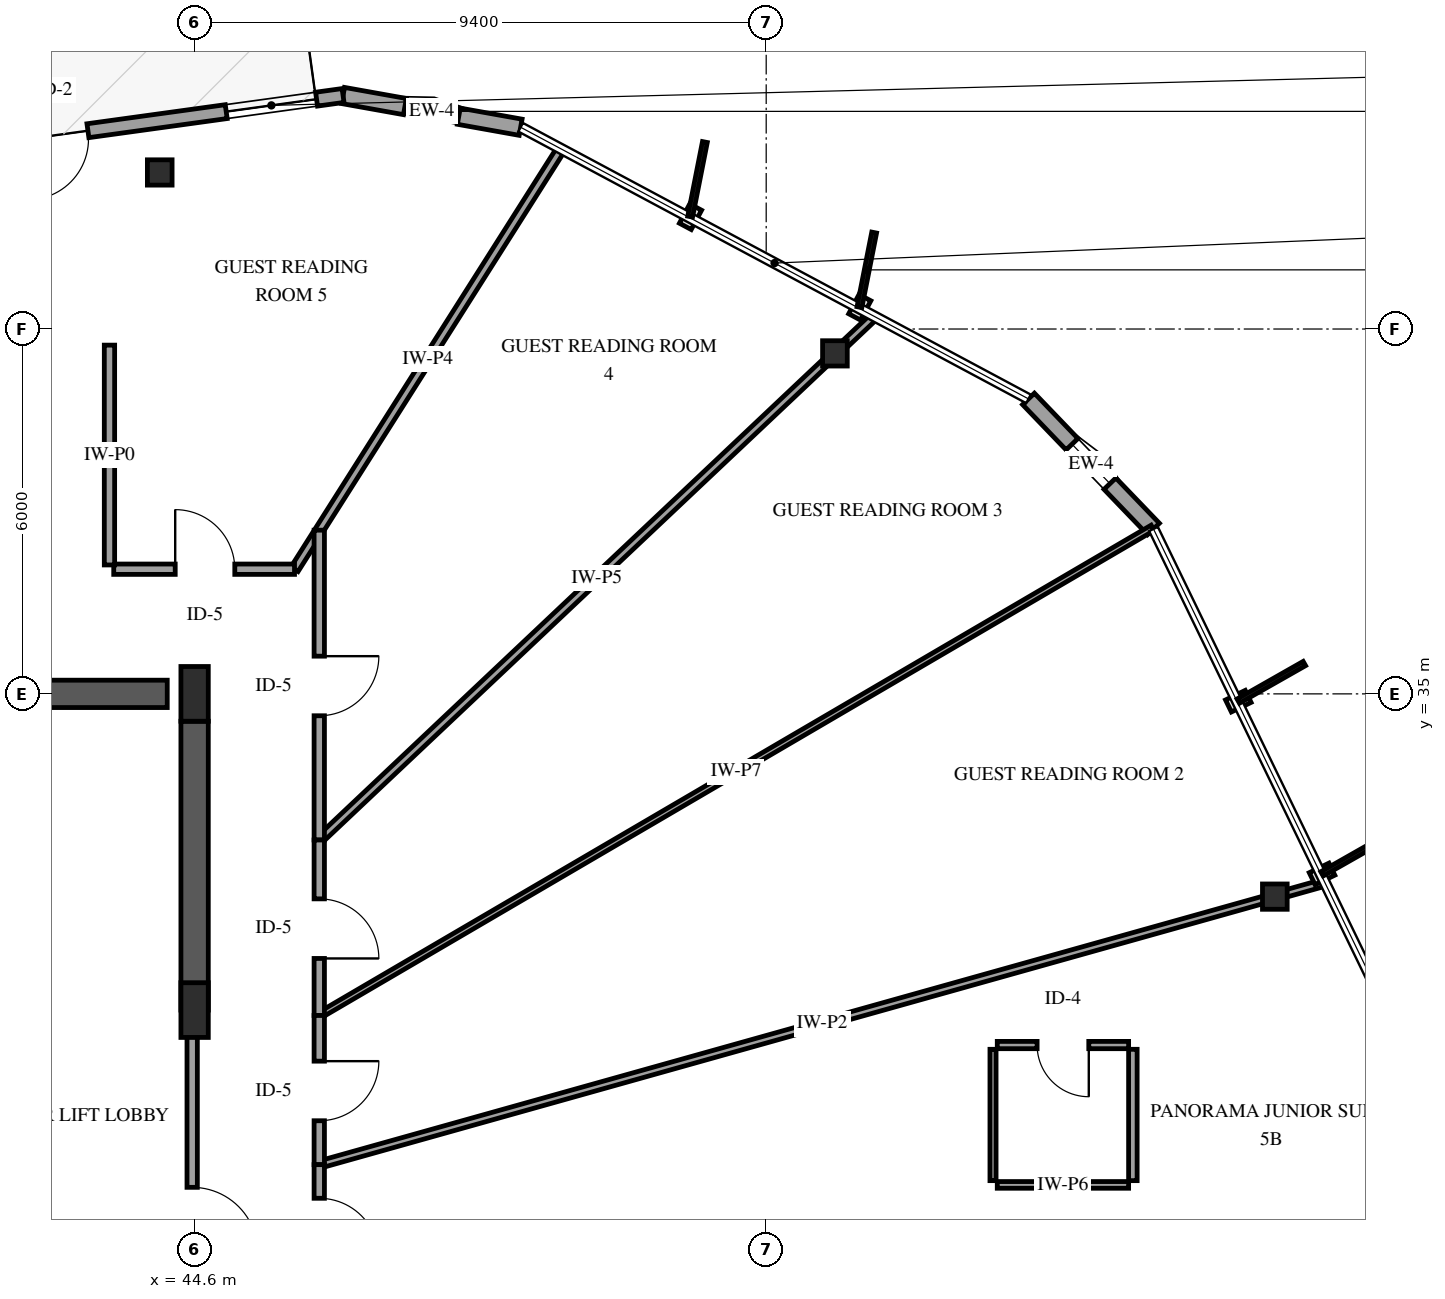
"""IFC4 building model, lengths in metres.
Left out: names, types, materials, properties, quantities, classifications, styles, units other than length and angle.
Written with IfcOpenShell. Run it as: python <this file> out.ifc"""

import sys

from ifc_helpers import new_model, si_unit, direction, frame, frame_2d, origin, origin_2d, place, context, subcontext, project, spatial, rectangle, i_section, extrude, element, fill, save


model = new_model("IFC4")
c1 = context("Model", 3, precision=1e-05, world=origin(), true_north=direction((0.0, 1.0)))
c2 = subcontext(c1, "Body", "Model", "MODEL_VIEW")
j1 = project(units=[si_unit("LENGTHUNIT", "METRE"), si_unit("PLANEANGLEUNIT", "RADIAN")], contexts=[c1])
p1 = place(None, origin())
s1 = spatial("IfcSite", under=j1, at=p1, CompositionType="ELEMENT")
p2 = place(p1, origin())
s2 = spatial("IfcBuilding", under=s1, at=p2, CompositionType="ELEMENT")
p3 = place(p2, frame((0.0, 0.0, 194.2)))
s3 = spatial("IfcBuildingStorey", under=s2, at=p3, CompositionType="ELEMENT", Elevation=194.2)
p4 = place(p3, frame((41.3, 35.0, 0.0), z_axis=(0.0, 0.0, 1.0), x_axis=(1.0, 0.0, 0.0)))
e1 = element("IfcWall", 1, at=p4, inside=s3, PredefinedType="SHEAR", context=c2, shape_type="SweptSolid", body=[
    extrude(rectangle(XDim=2.85, YDim=0.45, at=frame_2d((1.425, 0.0))), origin(), (0.0, 0.0, 1.0), 3.6),
])
p5 = place(p3, frame((44.6, 29.8, 0.0), z_axis=(0.0, 0.0, 1.0), x_axis=(0.0, 1.0, 0.0)))
e2 = element("IfcWall", 2, at=p5, inside=s3, PredefinedType="SHEAR", context=c2, shape_type="SweptSolid", body=[
    extrude(rectangle(XDim=4.75, YDim=0.45, at=frame_2d((2.375, 0.0))), origin(), (0.0, 0.0, 1.0), 3.6),
])
for number, where, z_axis, x_axis in (
    (3, (44.6, 29.8, 0.0), (0.0, 0.0, 1.0), (1.0, 0.0, 0.0)),
    (4, (44.6, 35.0, 0.0), (0.0, 0.0, 1.0), (1.0, 0.0, 0.0)),
):
    element("IfcColumn", number, at=place(p3, frame(where, z_axis=z_axis, x_axis=x_axis)), inside=s3, PredefinedType="PILASTER", context=c2, shape_type="SweptSolid", body=[
        extrude(rectangle(XDim=0.45, YDim=0.9, at=origin_2d()), origin(), (0.0, 0.0, 1.0), 3.6),
    ])
for number, where, z_axis, x_axis in (
    (5, (62.365, 31.666, 0.0), (0.0, 0.0, 1.0), (1.0, 0.0, 0.0)),
    (6, (55.13, 40.599, 0.0), (0.0, 0.0, 1.0), (1.0, 0.0, 0.0)),
    (7, (44.027, 43.574, 0.0), (0.0, 0.0, 1.0), (1.0, 0.0, 0.0)),
):
    element("IfcColumn", number, at=place(p3, frame(where, z_axis=z_axis, x_axis=x_axis)), inside=s3, PredefinedType="COLUMN", context=c2, shape_type="SweptSolid", body=[
        extrude(i_section(OverallWidth=0.406, OverallDepth=0.416, WebThickness=0.03, FlangeThickness=0.048, FilletRadius=0.038, at=origin_2d()), origin(), (0.0, 0.0, 1.0), 3.6),
    ])
p6 = place(p3, frame((49.962, 44.318, 0.0), z_axis=(0.0, 0.0, 1.0), x_axis=(-0.984385841961, 0.176024186253, 0.0)))
e8 = element("IfcWall", 8, at=p6, inside=s3, PredefinedType="SOLIDWALL", context=c2, shape_type="SweptSolid", body=[
    extrude(rectangle(XDim=2.967, YDim=0.27, at=frame_2d((1.483, 0.0))), origin(), (0.0, 0.0, 1.0), 2.679),
])
p7 = place(p6, frame((1.033, 0.0, 0.75)))
e9 = element("IfcOpeningElement", 9, at=p7, cuts=e8, PredefinedType="OPENING", context=c2, shape_type="SweptSolid", body=[
    extrude(rectangle(XDim=0.9, YDim=1.5, at=frame_2d((0.45, 0.75))), frame((0.0, 0.145, 0.0), z_axis=(0.0, -1.0, 0.0), x_axis=(1.0, 0.0, 0.0)), (0.0, 0.0, 1.0), 0.29),
])
p8 = place(p3, frame((47.042, 44.84, 0.0), z_axis=(0.0, 0.0, 1.0), x_axis=(-0.990605602179, -0.136749921142, 0.0)))
e10 = element("IfcWall", 10, at=p8, inside=s3, PredefinedType="SOLIDWALL", context=c2, shape_type="SweptSolid", body=[
    extrude(rectangle(XDim=9.471, YDim=0.23, at=frame_2d((4.735, 0.0))), origin(), (0.0, 0.0, 1.0), 2.679),
])
p9 = place(p8, frame((4.236, 0.0, 0.0)))
e11 = element("IfcOpeningElement", 11, at=p9, cuts=e10, PredefinedType="OPENING", context=c2, shape_type="SweptSolid", body=[
    extrude(rectangle(XDim=1.0, YDim=2.15, at=frame_2d((0.5, 1.075))), frame((0.0, 0.125, 0.0), z_axis=(0.0, -1.0, 0.0), x_axis=(1.0, 0.0, 0.0)), (0.0, 0.0, 1.0), 0.25),
])
p10 = place(p8, frame((0.44, 0.0, 0.72)))
e12 = element("IfcOpeningElement", 12, at=p10, cuts=e10, PredefinedType="OPENING", context=c2, shape_type="SweptSolid", body=[
    extrude(rectangle(XDim=1.5, YDim=1.7, at=frame_2d((0.75, 0.85))), frame((0.0, 0.125, 0.0), z_axis=(0.0, -1.0, 0.0), x_axis=(1.0, 0.0, 0.0)), (0.0, 0.0, 1.0), 0.25),
])
p11 = place(p8, frame((6.29, 0.0, 0.72)))
e13 = element("IfcOpeningElement", 13, at=p11, cuts=e10, PredefinedType="OPENING", context=c2, shape_type="SweptSolid", body=[
    extrude(rectangle(XDim=1.5, YDim=1.7, at=frame_2d((0.75, 0.85))), frame((0.0, 0.125, 0.0), z_axis=(0.0, -1.0, 0.0), x_axis=(1.0, 0.0, 0.0)), (0.0, 0.0, 1.0), 0.25),
])
p12 = place(p3, frame((60.369, 37.712, 0.0), z_axis=(0.0, 0.0, 1.0), x_axis=(-0.692893222066, 0.721040208875, 0.0)))
e14 = element("IfcWall", 14, at=p12, inside=s3, PredefinedType="SOLIDWALL", context=c2, shape_type="SweptSolid", body=[
    extrude(rectangle(XDim=2.967, YDim=0.27, at=frame_2d((1.483, 0.0))), origin(), (0.0, 0.0, 1.0), 2.679),
])
p13 = place(p12, frame((1.033, 0.0, 0.75)))
e15 = element("IfcOpeningElement", 15, at=p13, cuts=e14, PredefinedType="OPENING", context=c2, shape_type="SweptSolid", body=[
    extrude(rectangle(XDim=0.9, YDim=1.5, at=frame_2d((0.45, 0.75))), frame((0.0, 0.145, 0.0), z_axis=(0.0, -1.0, 0.0), x_axis=(1.0, 0.0, 0.0)), (0.0, 0.0, 1.0), 0.29),
])
p14 = place(p3, frame((46.65, 27.258, 0.0), z_axis=(0.0, 0.0, 1.0), x_axis=(0.962839177332, 0.270075394279, 0.0)))
e16 = element("IfcWall", 16, at=p14, inside=s3, PredefinedType="PARTITIONING", context=c2, shape_type="SweptSolid", body=[
    extrude(rectangle(XDim=17.176, YDim=0.12, at=frame_2d((8.588, 0.0))), origin(), (0.0, 0.0, 1.0), 3.3),
])
p15 = place(p3, frame((46.65, 29.711, 0.0), z_axis=(0.0, 0.0, 1.0), x_axis=(0.863097832906, 0.505036761863, 0.0)))
e17 = element("IfcWall", 17, at=p15, inside=s3, PredefinedType="PARTITIONING", context=c2, shape_type="SweptSolid", body=[
    extrude(rectangle(XDim=15.88, YDim=0.1, at=frame_2d((7.94, 0.0))), origin(), (0.0, 0.0, 1.0), 3.3),
])
p16 = place(p3, frame((46.65, 32.597, 0.0), z_axis=(0.0, 0.0, 1.0), x_axis=(0.727327128762, 0.686290935221, 0.0)))
e18 = element("IfcWall", 18, at=p16, inside=s3, PredefinedType="PARTITIONING", context=c2, shape_type="SweptSolid", body=[
    extrude(rectangle(XDim=12.547, YDim=0.13, at=frame_2d((6.274, 0.0))), origin(), (0.0, 0.0, 1.0), 2.595),
])
p17 = place(p3, frame((46.243, 37.05, 0.0), z_axis=(0.0, 0.0, 1.0), x_axis=(0.535620370442, 0.844458891106, 0.0)))
e19 = element("IfcWall", 19, at=p17, inside=s3, PredefinedType="PARTITIONING", context=c2, shape_type="SweptSolid", body=[
    extrude(rectangle(XDim=8.185, YDim=0.14, at=frame_2d((4.093, 0.0))), origin(), (0.0, 0.0, 1.0), 3.3),
])
p18 = place(p3, frame((44.56, 29.8, 0.0), z_axis=(0.0, 0.0, 1.0), x_axis=(0.0, -1.0, 0.0)))
e20 = element("IfcWall", 20, at=p18, inside=s3, PredefinedType="PARTITIONING", context=c2, shape_type="SweptSolid", body=[
    extrude(rectangle(XDim=6.91, YDim=0.17, at=frame_2d((3.455, 0.0))), origin(), (0.0, 0.0, 1.0), 2.34),
])
p19 = place(p18, frame((2.915, 0.0, 0.0)))
e21 = element("IfcOpeningElement", 21, at=p19, cuts=e20, PredefinedType="OPENING", context=c2, shape_type="SweptSolid", body=[
    extrude(rectangle(XDim=1.08, YDim=2.15, at=frame_2d((0.54, 1.075))), frame((0.0, 0.095, 0.0), z_axis=(0.0, -1.0, 0.0), x_axis=(1.0, 0.0, 0.0)), (0.0, 0.0, 1.0), 0.19),
])
p20 = place(p3, frame((46.65, 37.692, 0.0), z_axis=(0.0, 0.0, 1.0), x_axis=(0.0, -1.0, 0.0)))
e22 = element("IfcWall", 22, at=p20, inside=s3, PredefinedType="PARTITIONING", context=c2, shape_type="SweptSolid", body=[
    extrude(rectangle(XDim=5.095, YDim=0.17, at=frame_2d((2.547, 0.0))), origin(), (0.0, 0.0, 1.0), 3.3),
])
p21 = place(p20, frame((2.072, 0.0, 0.0)))
e23 = element("IfcOpeningElement", 23, at=p21, cuts=e22, PredefinedType="OPENING", context=c2, shape_type="SweptSolid", body=[
    extrude(rectangle(XDim=0.98, YDim=2.15, at=frame_2d((0.49, 1.075))), frame((0.0, 0.095, 0.0), z_axis=(0.0, -1.0, 0.0), x_axis=(1.0, 0.0, 0.0)), (0.0, 0.0, 1.0), 0.19),
])
p22 = place(p3, frame((43.27, 37.05, 0.0), z_axis=(0.0, 0.0, 1.0), x_axis=(1.0, 0.0, 0.0)))
e24 = element("IfcWall", 24, at=p22, inside=s3, PredefinedType="PARTITIONING", context=c2, shape_type="SweptSolid", body=[
    extrude(rectangle(XDim=2.973, YDim=0.17, at=frame_2d((1.486, 0.0))), origin(), (0.0, 0.0, 1.0), 3.3),
])
p23 = place(p22, frame((1.011, 0.0, 0.0)))
e25 = element("IfcOpeningElement", 25, at=p23, cuts=e24, PredefinedType="OPENING", context=c2, shape_type="SweptSolid", body=[
    extrude(rectangle(XDim=0.98, YDim=2.15, at=frame_2d((0.49, 1.075))), frame((0.0, 0.095, 0.0), z_axis=(0.0, -1.0, 0.0), x_axis=(1.0, 0.0, 0.0)), (0.0, 0.0, 1.0), 0.19),
])
p24 = place(p3, frame((46.65, 32.597, 0.0), z_axis=(0.0, 0.0, 1.0), x_axis=(0.0, -1.0, 0.0)))
e26 = element("IfcWall", 26, at=p24, inside=s3, PredefinedType="PARTITIONING", context=c2, shape_type="SweptSolid", body=[
    extrude(rectangle(XDim=2.886, YDim=0.17, at=frame_2d((1.443, 0.0))), origin(), (0.0, 0.0, 1.0), 3.3),
])
p25 = place(p24, frame((0.968, 0.0, 0.0)))
e27 = element("IfcOpeningElement", 27, at=p25, cuts=e26, PredefinedType="OPENING", context=c2, shape_type="SweptSolid", body=[
    extrude(rectangle(XDim=0.98, YDim=2.15, at=frame_2d((0.49, 1.075))), frame((0.0, 0.095, 0.0), z_axis=(0.0, -1.0, 0.0), x_axis=(1.0, 0.0, 0.0)), (0.0, 0.0, 1.0), 0.19),
])
p26 = place(p3, frame((46.65, 29.711, 0.0), z_axis=(0.0, 0.0, 1.0), x_axis=(0.0, -1.0, 0.0)))
e28 = element("IfcWall", 28, at=p26, inside=s3, PredefinedType="PARTITIONING", context=c2, shape_type="SweptSolid", body=[
    extrude(rectangle(XDim=2.453, YDim=0.17, at=frame_2d((1.227, 0.0))), origin(), (0.0, 0.0, 1.0), 3.3),
])
p27 = place(p26, frame((0.751, 0.0, 0.0)))
e29 = element("IfcOpeningElement", 29, at=p27, cuts=e28, PredefinedType="OPENING", context=c2, shape_type="SweptSolid", body=[
    extrude(rectangle(XDim=0.98, YDim=2.15, at=frame_2d((0.49, 1.075))), frame((0.0, 0.095, 0.0), z_axis=(0.0, -1.0, 0.0), x_axis=(1.0, 0.0, 0.0)), (0.0, 0.0, 1.0), 0.19),
])
p28 = place(p3, frame((59.96, 29.225, 0.0), z_axis=(0.0, 0.0, 1.0), x_axis=(-1.0, 0.0, 0.0)))
e30 = element("IfcWall", 30, at=p28, inside=s3, PredefinedType="PARTITIONING", context=c2, shape_type="SweptSolid", body=[
    extrude(rectangle(XDim=2.16, YDim=0.12, at=frame_2d((1.08, 0.0))), origin(), (0.0, 0.0, 1.0), 3.3),
])
p29 = place(p28, frame((0.655, 0.0, 0.0)))
e31 = element("IfcOpeningElement", 31, at=p29, cuts=e30, PredefinedType="OPENING", context=c2, shape_type="SweptSolid", body=[
    extrude(rectangle(XDim=0.85, YDim=2.1, at=frame_2d((0.425, 1.05))), frame((0.0, 0.07, 0.0), z_axis=(0.0, -1.0, 0.0), x_axis=(1.0, 0.0, 0.0)), (0.0, 0.0, 1.0), 0.14),
])
p30 = place(p3, frame((57.8, 26.925, 0.0), z_axis=(0.0, 0.0, 1.0), x_axis=(1.0, 0.0, 0.0)))
e32 = element("IfcWall", 32, at=p30, inside=s3, PredefinedType="PARTITIONING", context=c2, shape_type="SweptSolid", body=[
    extrude(rectangle(XDim=2.16, YDim=0.11, at=frame_2d((1.08, 0.0))), origin(), (0.0, 0.0, 1.0), 3.3),
])
p31 = place(p3, frame((57.73, 29.155, 0.0), z_axis=(0.0, 0.0, 1.0), x_axis=(0.0, -1.0, 0.0)))
e33 = element("IfcWall", 33, at=p31, inside=s3, PredefinedType="PARTITIONING", context=c2, shape_type="SweptSolid", body=[
    extrude(rectangle(XDim=2.16, YDim=0.1, at=frame_2d((1.08, 0.0))), origin(), (0.0, 0.0, 1.0), 3.3),
])
p32 = place(p3, frame((60.03, 26.995, 0.0), z_axis=(0.0, 0.0, 1.0), x_axis=(0.0, 1.0, 0.0)))
e34 = element("IfcWall", 34, at=p32, inside=s3, PredefinedType="PARTITIONING", context=c2, shape_type="SweptSolid", body=[
    extrude(rectangle(XDim=2.16, YDim=0.14, at=frame_2d((1.08, 0.0))), origin(), (0.0, 0.0, 1.0), 3.3),
])
p33 = place(p3, frame((46.65, 27.258, 0.0), z_axis=(0.0, 0.0, 1.0), x_axis=(0.0, -1.0, 0.0)))
e35 = element("IfcWall", 35, at=p33, inside=s3, PredefinedType="PARTITIONING", context=c2, shape_type="SweptSolid", body=[
    extrude(rectangle(XDim=2.056, YDim=0.17, at=frame_2d((1.028, 0.0))), origin(), (0.0, 0.0, 1.0), 3.3),
])
p34 = place(p33, frame((0.553, 0.0, 0.0)))
e36 = element("IfcOpeningElement", 36, at=p34, cuts=e35, PredefinedType="OPENING", context=c2, shape_type="SweptSolid", body=[
    extrude(rectangle(XDim=0.98, YDim=2.15, at=frame_2d((0.49, 1.075))), frame((0.0, 0.095, 0.0), z_axis=(0.0, -1.0, 0.0), x_axis=(1.0, 0.0, 0.0)), (0.0, 0.0, 1.0), 0.19),
])
p35 = place(p3, frame((43.2, 40.735, 0.0), z_axis=(0.0, 0.0, 1.0), x_axis=(0.0, -1.0, 0.0)))
e37 = element("IfcWall", 37, at=p35, inside=s3, PredefinedType="PARTITIONING", context=c2, shape_type="SweptSolid", body=[
    extrude(rectangle(XDim=3.615, YDim=0.17, at=frame_2d((1.808, 0.0))), origin(), (0.0, 0.0, 1.0), 2.595),
])
p36 = place(p7, origin())
e38 = element("IfcWindow", 38, at=p36, inside=s3, PartitioningType="SINGLE_PANEL", PredefinedType="WINDOW", context=c2, shape_type="SweptSolid", body=[
    extrude(rectangle(XDim=0.9, YDim=1.5, at=frame_2d((0.45, 0.75))), frame((0.0, 0.03, 0.0), z_axis=(0.0, -1.0, 0.0), x_axis=(1.0, 0.0, 0.0)), (0.0, 0.0, 1.0), 0.06),
])
fill(e9, e38)
p37 = place(p9, origin())
e39 = element("IfcDoor", 39, at=p37, inside=s3, OperationType="SINGLE_SWING_RIGHT", PredefinedType="DOOR", context=c2, shape_type="SweptSolid", body=[
    extrude(rectangle(XDim=1.0, YDim=2.15, at=frame_2d((0.5, 1.075))), frame((0.0, 0.025, 0.0), z_axis=(0.0, -1.0, 0.0), x_axis=(1.0, 0.0, 0.0)), (0.0, 0.0, 1.0), 0.05),
])
fill(e11, e39)
p38 = place(p10, origin())
e40 = element("IfcWindow", 40, at=p38, inside=s3, PartitioningType="SINGLE_PANEL", PredefinedType="WINDOW", context=c2, shape_type="SweptSolid", body=[
    extrude(rectangle(XDim=1.5, YDim=1.7, at=frame_2d((0.75, 0.85))), frame((0.0, 0.03, 0.0), z_axis=(0.0, -1.0, 0.0), x_axis=(1.0, 0.0, 0.0)), (0.0, 0.0, 1.0), 0.06),
])
fill(e12, e40)
p39 = place(p13, origin())
e41 = element("IfcWindow", 41, at=p39, inside=s3, PartitioningType="SINGLE_PANEL", PredefinedType="WINDOW", context=c2, shape_type="SweptSolid", body=[
    extrude(rectangle(XDim=0.9, YDim=1.5, at=frame_2d((0.45, 0.75))), frame((0.0, 0.03, 0.0), z_axis=(0.0, -1.0, 0.0), x_axis=(1.0, 0.0, 0.0)), (0.0, 0.0, 1.0), 0.06),
])
fill(e15, e41)
p40 = place(p19, origin())
e42 = element("IfcDoor", 42, at=p40, inside=s3, OperationType="SINGLE_SWING_RIGHT", PredefinedType="DOOR", context=c2, shape_type="SweptSolid", body=[
    extrude(rectangle(XDim=1.08, YDim=2.15, at=frame_2d((0.54, 1.075))), frame((0.0, 0.025, 0.0), z_axis=(0.0, -1.0, 0.0), x_axis=(1.0, 0.0, 0.0)), (0.0, 0.0, 1.0), 0.05),
])
fill(e21, e42)
p41 = place(p21, origin())
e43 = element("IfcDoor", 43, at=p41, inside=s3, OperationType="SINGLE_SWING_LEFT", PredefinedType="DOOR", context=c2, shape_type="SweptSolid", body=[
    extrude(rectangle(XDim=0.98, YDim=2.15, at=frame_2d((0.49, 1.075))), frame((0.0, 0.025, 0.0), z_axis=(0.0, -1.0, 0.0), x_axis=(1.0, 0.0, 0.0)), (0.0, 0.0, 1.0), 0.05),
])
fill(e23, e43)
p42 = place(p23, origin())
e44 = element("IfcDoor", 44, at=p42, inside=s3, OperationType="SINGLE_SWING_LEFT", PredefinedType="DOOR", context=c2, shape_type="SweptSolid", body=[
    extrude(rectangle(XDim=0.98, YDim=2.15, at=frame_2d((0.49, 1.075))), frame((0.0, 0.025, 0.0), z_axis=(0.0, -1.0, 0.0), x_axis=(1.0, 0.0, 0.0)), (0.0, 0.0, 1.0), 0.05),
])
fill(e25, e44)
p43 = place(p25, origin())
e45 = element("IfcDoor", 45, at=p43, inside=s3, OperationType="SINGLE_SWING_RIGHT", PredefinedType="DOOR", context=c2, shape_type="SweptSolid", body=[
    extrude(rectangle(XDim=0.98, YDim=2.15, at=frame_2d((0.49, 1.075))), frame((0.0, 0.025, 0.0), z_axis=(0.0, -1.0, 0.0), x_axis=(1.0, 0.0, 0.0)), (0.0, 0.0, 1.0), 0.05),
])
fill(e27, e45)
p44 = place(p27, origin())
e46 = element("IfcDoor", 46, at=p44, inside=s3, OperationType="SINGLE_SWING_LEFT", PredefinedType="DOOR", context=c2, shape_type="SweptSolid", body=[
    extrude(rectangle(XDim=0.98, YDim=2.15, at=frame_2d((0.49, 1.075))), frame((0.0, 0.025, 0.0), z_axis=(0.0, -1.0, 0.0), x_axis=(1.0, 0.0, 0.0)), (0.0, 0.0, 1.0), 0.05),
])
fill(e29, e46)
p45 = place(p29, origin())
e47 = element("IfcDoor", 47, at=p45, inside=s3, OperationType="SINGLE_SWING_LEFT", PredefinedType="DOOR", context=c2, shape_type="SweptSolid", body=[
    extrude(rectangle(XDim=0.85, YDim=2.1, at=frame_2d((0.425, 1.05))), frame((0.0, 0.025, 0.0), z_axis=(0.0, -1.0, 0.0), x_axis=(1.0, 0.0, 0.0)), (0.0, 0.0, 1.0), 0.05),
])
fill(e31, e47)
p46 = place(p34, origin())
e48 = element("IfcDoor", 48, at=p46, inside=s3, OperationType="SINGLE_SWING_RIGHT", PredefinedType="DOOR", context=c2, shape_type="SweptSolid", body=[
    extrude(rectangle(XDim=0.98, YDim=2.15, at=frame_2d((0.49, 1.075))), frame((0.0, 0.025, 0.0), z_axis=(0.0, -1.0, 0.0), x_axis=(1.0, 0.0, 0.0)), (0.0, 0.0, 1.0), 0.05),
])
fill(e36, e48)
save(model, sys.argv[1])
